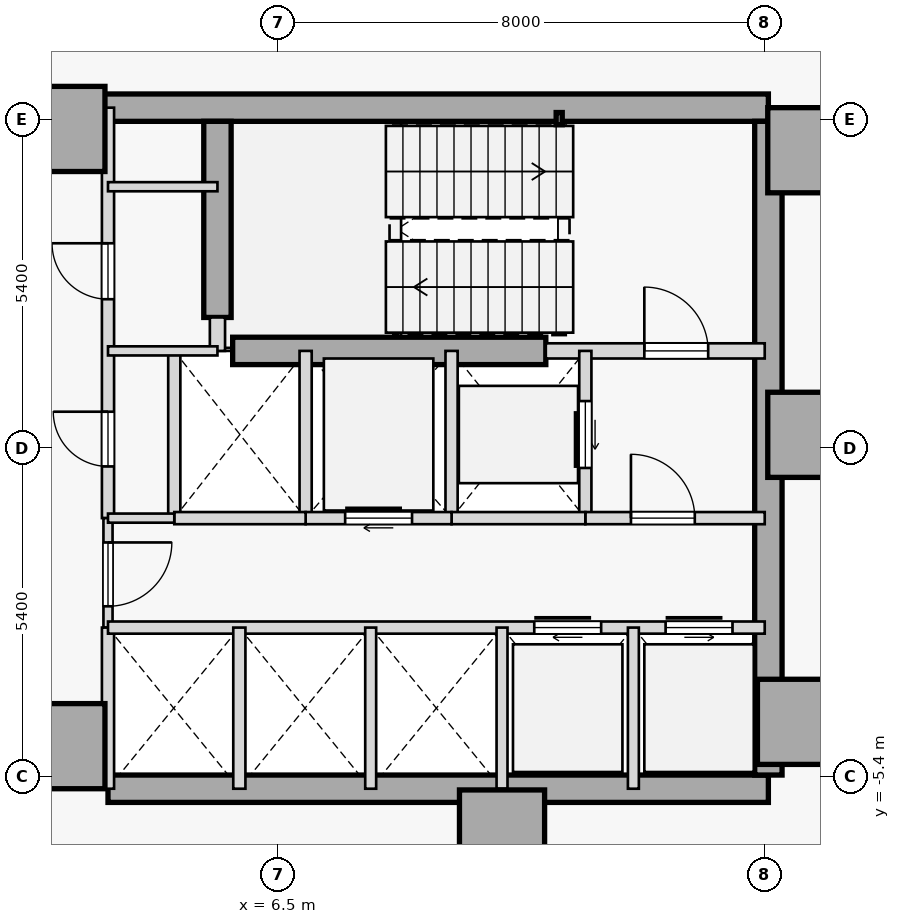
"""IFC4 building model, lengths in metres.
Left out: names, types, materials, properties, quantities, classifications, styles, units other than length and angle.
Written with IfcOpenShell. Run it as: python <this file> out.ifc"""

import sys

from ifc_helpers import new_model, si_unit, direction, frame, frame_2d, origin, origin_2d, place, context, subcontext, project, spatial, rectangle, hollow_rectangle, extrude, element, fill, save


model = new_model("IFC4")
c1 = context("Model", 3, precision=1e-05, world=origin(), true_north=direction((0.0, 1.0)))
c2 = subcontext(c1, "Body", "Model", "MODEL_VIEW")
j1 = project(units=[si_unit("LENGTHUNIT", "METRE"), si_unit("PLANEANGLEUNIT", "RADIAN")], contexts=[c1])
p1 = place(None, origin())
s1 = spatial("IfcSite", under=j1, at=p1, CompositionType="ELEMENT")
p2 = place(p1, origin())
s2 = spatial("IfcBuilding", under=s1, at=p2, CompositionType="ELEMENT")
p3 = place(p2, frame((0.0, 0.0, 67.4)))
s3 = spatial("IfcBuildingStorey", under=s2, at=p3, CompositionType="ELEMENT", Elevation=67.4)
for number, where, z_axis, x_axis in (
    (1, (15.25, 4.9, 0.0), (0.0, 0.0, 1.0), (1.0, 0.0, 0.0)),
    (2, (15.25, 0.22, 0.0), (0.0, 0.0, 1.0), (1.0, 0.0, 0.0)),
    (3, (15.08, -4.5, 0.0), (0.0, 0.0, 1.0), (1.0, 0.0, 0.0)),
    (4, (10.18, -6.32, 0.0), (0.0, 0.0, 1.0), (1.0, 0.0, 0.0)),
    (5, (2.95, -4.9, 0.0), (0.0, 0.0, 1.0), (1.0, 0.0, 0.0)),
    (6, (2.95, 5.25, 0.0), (0.0, 0.0, 1.0), (1.0, 0.0, 0.0)),
):
    element("IfcColumn", number, at=place(p3, frame(where, z_axis=z_axis, x_axis=x_axis)), inside=s3, PredefinedType="COLUMN", context=c2, shape_type="SweptSolid", body=[
        extrude(rectangle(XDim=1.4, YDim=1.4, at=origin_2d()), origin(), (0.0, 0.0, 1.0), 3.8),
    ])
p4 = place(p3, frame((3.15, 5.6, 0.0), z_axis=(0.0, 0.0, 1.0), x_axis=(1.0, 0.0, 0.0)))
e7 = element("IfcWall", 7, at=p4, inside=s3, PredefinedType="SHEAR", context=c2, shape_type="SweptSolid", body=[
    extrude(rectangle(XDim=11.41, YDim=0.45, at=frame_2d((5.705, 0.0))), origin(), (0.0, 0.0, 1.0), 3.575),
])
p5 = place(p3, frame((3.7, -5.6, 0.0), z_axis=(0.0, 0.0, 1.0), x_axis=(1.0, 0.0, 0.0)))
e8 = element("IfcWall", 8, at=p5, inside=s3, PredefinedType="SHEAR", context=c2, shape_type="SweptSolid", body=[
    extrude(rectangle(XDim=10.86, YDim=0.45, at=frame_2d((5.43, 0.0))), origin(), (0.0, 0.0, 1.0), 3.575),
])
p6 = place(p3, frame((14.56, -5.375, 0.0), z_axis=(0.0, 0.0, 1.0), x_axis=(0.0, 1.0, 0.0)))
e9 = element("IfcWall", 9, at=p6, inside=s3, PredefinedType="SHEAR", context=c2, shape_type="SweptSolid", body=[
    extrude(rectangle(XDim=10.75, YDim=0.45, at=frame_2d((5.375, 0.0))), origin(), (0.0, 0.0, 1.0), 3.575),
])
p7 = place(p3, frame((5.5, 2.15, 0.0), z_axis=(0.0, 0.0, 1.0), x_axis=(0.0, 1.0, 0.0)))
e10 = element("IfcWall", 10, at=p7, inside=s3, PredefinedType="SHEAR", context=c2, shape_type="SweptSolid", body=[
    extrude(rectangle(XDim=3.225, YDim=0.45, at=frame_2d((1.613, 0.0))), origin(), (0.0, 0.0, 1.0), 3.575),
])
p8 = place(p3, frame((5.75, 1.6, 0.0), z_axis=(0.0, 0.0, 1.0), x_axis=(1.0, 0.0, 0.0)))
e11 = element("IfcWall", 11, at=p8, inside=s3, PredefinedType="SHEAR", context=c2, shape_type="SweptSolid", body=[
    extrude(rectangle(XDim=5.15, YDim=0.45, at=frame_2d((2.575, 0.0))), origin(), (0.0, 0.0, 1.0), 3.575),
])
p9 = place(p3, frame((11.12, 5.42, 0.0), z_axis=(0.0, 0.0, 1.0), x_axis=(1.0, 0.0, 0.0)))
e12 = element("IfcColumn", 12, at=p9, inside=s3, PredefinedType="COLUMN", context=c2, shape_type="SweptSolid", body=[
    extrude(hollow_rectangle(XDim=0.1, YDim=0.2, WallThickness=0.008, at=origin_2d()), origin(), (0.0, 0.0, 1.0), 3.8),
])
p10 = place(p3, frame((10.9, 1.6, 0.0), z_axis=(0.0, 0.0, 1.0), x_axis=(1.0, 0.0, 0.0)))
e13 = element("IfcWall", 13, at=p10, inside=s3, PredefinedType="STANDARD", context=c2, shape_type="SweptSolid", body=[
    extrude(rectangle(XDim=3.6, YDim=0.25, at=frame_2d((1.8, 0.0))), origin(), (0.0, 0.0, 1.0), 3.575),
])
p11 = place(p10, frame((1.62, 0.0, 0.0)))
e14 = element("IfcOpeningElement", 14, at=p11, cuts=e13, PredefinedType="OPENING", context=c2, shape_type="SweptSolid", body=[
    extrude(rectangle(XDim=1.05, YDim=2.15, at=frame_2d((0.525, 1.075))), frame((0.0, 0.135, 0.0), z_axis=(0.0, -1.0, 0.0), x_axis=(1.0, 0.0, 0.0)), (0.0, 0.0, 1.0), 0.27),
])
p12 = place(p3, frame((5.5, 1.6, 0.0), z_axis=(0.0, 0.0, 1.0), x_axis=(0.0, 1.0, 0.0)))
e15 = element("IfcWall", 15, at=p12, inside=s3, PredefinedType="STANDARD", context=c2, shape_type="SweptSolid", body=[
    extrude(rectangle(XDim=0.55, YDim=0.25, at=frame_2d((0.275, 0.0))), origin(), (0.0, 0.0, 1.0), 3.575),
])
p13 = place(p3, frame((3.7, -1.15, 0.0), z_axis=(0.0, 0.0, 1.0), x_axis=(0.0, 1.0, 0.0)))
e16 = element("IfcWall", 16, at=p13, inside=s3, PredefinedType="STANDARD", context=c2, shape_type="SweptSolid", body=[
    extrude(rectangle(XDim=6.75, YDim=0.2, at=frame_2d((3.375, 0.0))), origin(), (0.0, 0.0, 1.0), 3.575),
])
p14 = place(p13, frame((3.6, 0.0, 0.0)))
e17 = element("IfcOpeningElement", 17, at=p14, cuts=e16, PredefinedType="OPENING", context=c2, shape_type="SweptSolid", body=[
    extrude(rectangle(XDim=0.92, YDim=2.15, at=frame_2d((0.46, 1.075))), frame((0.0, 0.11, 0.0), z_axis=(0.0, -1.0, 0.0), x_axis=(1.0, 0.0, 0.0)), (0.0, 0.0, 1.0), 0.22),
])
p15 = place(p13, frame((0.85, 0.0, 0.0)))
e18 = element("IfcOpeningElement", 18, at=p15, cuts=e16, PredefinedType="OPENING", context=c2, shape_type="SweptSolid", body=[
    extrude(rectangle(XDim=0.9, YDim=2.15, at=frame_2d((0.45, 1.075))), frame((0.0, 0.11, 0.0), z_axis=(0.0, -1.0, 0.0), x_axis=(1.0, 0.0, 0.0)), (0.0, 0.0, 1.0), 0.22),
])
p16 = place(p3, frame((3.7, -2.95, 0.0), z_axis=(0.0, 0.0, 1.0), x_axis=(0.0, 1.0, 0.0)))
e19 = element("IfcWall", 19, at=p16, inside=s3, PredefinedType="PARTITIONING", context=c2, shape_type="SweptSolid", body=[
    extrude(rectangle(XDim=1.8, YDim=0.15, at=frame_2d((0.9, 0.0))), origin(), (0.0, 0.0, 1.0), 3.575),
])
p17 = place(p16, frame((0.35, 0.0, 0.0)))
e20 = element("IfcOpeningElement", 20, at=p17, cuts=e19, PredefinedType="OPENING", context=c2, shape_type="SweptSolid", body=[
    extrude(rectangle(XDim=1.05, YDim=2.18, at=frame_2d((0.525, 1.09))), frame((0.0, 0.085, 0.0), z_axis=(0.0, -1.0, 0.0), x_axis=(1.0, 0.0, 0.0)), (0.0, 0.0, 1.0), 0.17),
])
p18 = place(p3, frame((3.7, -5.6, 0.0), z_axis=(0.0, 0.0, 1.0), x_axis=(0.0, 1.0, 0.0)))
e21 = element("IfcWall", 21, at=p18, inside=s3, PredefinedType="STANDARD", context=c2, shape_type="SweptSolid", body=[
    extrude(rectangle(XDim=2.65, YDim=0.2, at=frame_2d((1.325, 0.0))), origin(), (0.0, 0.0, 1.0), 3.575),
])
p19 = place(p3, frame((11.55, -1.15, 0.0), z_axis=(0.0, 0.0, 1.0), x_axis=(0.0, 1.0, 0.0)))
e22 = element("IfcWall", 22, at=p19, inside=s3, PredefinedType="STANDARD", context=c2, shape_type="SweptSolid", body=[
    extrude(rectangle(XDim=2.75, YDim=0.2, at=frame_2d((1.375, 0.0))), origin(), (0.0, 0.0, 1.0), 3.575),
])
p20 = place(p19, frame((0.825, 0.0, 0.0)))
e23 = element("IfcOpeningElement", 23, at=p20, cuts=e22, PredefinedType="OPENING", context=c2, shape_type="SweptSolid", body=[
    extrude(rectangle(XDim=1.1, YDim=2.15, at=frame_2d((0.55, 1.075))), frame((0.0, 0.11, 0.0), z_axis=(0.0, -1.0, 0.0), x_axis=(1.0, 0.0, 0.0)), (0.0, 0.0, 1.0), 0.22),
])
p21 = place(p3, frame((9.35, -1.15, 0.0), z_axis=(0.0, 0.0, 1.0), x_axis=(0.0, 1.0, 0.0)))
e24 = element("IfcWall", 24, at=p21, inside=s3, PredefinedType="STANDARD", context=c2, shape_type="SweptSolid", body=[
    extrude(rectangle(XDim=2.75, YDim=0.2, at=frame_2d((1.375, 0.0))), origin(), (0.0, 0.0, 1.0), 3.575),
])
p22 = place(p3, frame((11.55, -1.15, 0.0), z_axis=(0.0, 0.0, 1.0), x_axis=(1.0, 0.0, 0.0)))
e25 = element("IfcWall", 25, at=p22, inside=s3, PredefinedType="STANDARD", context=c2, shape_type="SweptSolid", body=[
    extrude(rectangle(XDim=2.95, YDim=0.2, at=frame_2d((1.475, 0.0))), origin(), (0.0, 0.0, 1.0), 3.575),
])
p23 = place(p22, frame((0.75, 0.0, 0.0)))
e26 = element("IfcOpeningElement", 26, at=p23, cuts=e25, PredefinedType="OPENING", context=c2, shape_type="SweptSolid", body=[
    extrude(rectangle(XDim=1.05, YDim=2.18, at=frame_2d((0.525, 1.09))), frame((0.0, 0.11, 0.0), z_axis=(0.0, -1.0, 0.0), x_axis=(1.0, 0.0, 0.0)), (0.0, 0.0, 1.0), 0.22),
])
p24 = place(p3, frame((9.35, -1.15, 0.0), z_axis=(0.0, 0.0, 1.0), x_axis=(1.0, 0.0, 0.0)))
e27 = element("IfcWall", 27, at=p24, inside=s3, PredefinedType="STANDARD", context=c2, shape_type="SweptSolid", body=[
    extrude(rectangle(XDim=2.2, YDim=0.2, at=frame_2d((1.1, 0.0))), origin(), (0.0, 0.0, 1.0), 3.575),
])
p25 = place(p3, frame((6.95, -1.15, 0.0), z_axis=(0.0, 0.0, 1.0), x_axis=(0.0, 1.0, 0.0)))
e28 = element("IfcWall", 28, at=p25, inside=s3, PredefinedType="STANDARD", context=c2, shape_type="SweptSolid", body=[
    extrude(rectangle(XDim=2.75, YDim=0.2, at=frame_2d((1.375, 0.0))), origin(), (0.0, 0.0, 1.0), 3.575),
])
p26 = place(p3, frame((6.95, -1.15, 0.0), z_axis=(0.0, 0.0, 1.0), x_axis=(1.0, 0.0, 0.0)))
e29 = element("IfcWall", 29, at=p26, inside=s3, PredefinedType="STANDARD", context=c2, shape_type="SweptSolid", body=[
    extrude(rectangle(XDim=2.4, YDim=0.2, at=frame_2d((1.2, 0.0))), origin(), (0.0, 0.0, 1.0), 3.575),
])
p27 = place(p26, frame((0.65, 0.0, 0.0)))
e30 = element("IfcOpeningElement", 30, at=p27, cuts=e29, PredefinedType="OPENING", context=c2, shape_type="SweptSolid", body=[
    extrude(rectangle(XDim=1.1, YDim=2.15, at=frame_2d((0.55, 1.075))), frame((0.0, 0.11, 0.0), z_axis=(0.0, -1.0, 0.0), x_axis=(1.0, 0.0, 0.0)), (0.0, 0.0, 1.0), 0.22),
])
p28 = place(p3, frame((4.79, -1.15, 0.0), z_axis=(0.0, 0.0, 1.0), x_axis=(0.0, 1.0, 0.0)))
e31 = element("IfcWall", 31, at=p28, inside=s3, PredefinedType="STANDARD", context=c2, shape_type="SweptSolid", body=[
    extrude(rectangle(XDim=2.75, YDim=0.2, at=frame_2d((1.375, 0.0))), origin(), (0.0, 0.0, 1.0), 3.575),
])
p29 = place(p3, frame((4.79, -1.15, 0.0), z_axis=(0.0, 0.0, 1.0), x_axis=(1.0, 0.0, 0.0)))
e32 = element("IfcWall", 32, at=p29, inside=s3, PredefinedType="STANDARD", context=c2, shape_type="SweptSolid", body=[
    extrude(rectangle(XDim=2.16, YDim=0.2, at=frame_2d((1.08, 0.0))), origin(), (0.0, 0.0, 1.0), 3.575),
])
p30 = place(p3, frame((3.7, -1.15, 0.0), z_axis=(0.0, 0.0, 1.0), x_axis=(1.0, 0.0, 0.0)))
e33 = element("IfcWall", 33, at=p30, inside=s3, PredefinedType="PARTITIONING", context=c2, shape_type="SweptSolid", body=[
    extrude(rectangle(XDim=1.09, YDim=0.15, at=frame_2d((0.545, 0.0))), origin(), (0.0, 0.0, 1.0), 3.575),
])
p31 = place(p3, frame((3.7, -2.95, 0.0), z_axis=(0.0, 0.0, 1.0), x_axis=(1.0, 0.0, 0.0)))
e34 = element("IfcWall", 34, at=p31, inside=s3, PredefinedType="STANDARD", context=c2, shape_type="SweptSolid", body=[
    extrude(rectangle(XDim=10.8, YDim=0.2, at=frame_2d((5.4, 0.0))), origin(), (0.0, 0.0, 1.0), 3.575),
])
p32 = place(p31, frame((7.01, 0.0, 0.0)))
e35 = element("IfcOpeningElement", 35, at=p32, cuts=e34, PredefinedType="OPENING", context=c2, shape_type="SweptSolid", body=[
    extrude(rectangle(XDim=1.1, YDim=2.15, at=frame_2d((0.55, 1.075))), frame((0.0, 0.11, 0.0), z_axis=(0.0, -1.0, 0.0), x_axis=(1.0, 0.0, 0.0)), (0.0, 0.0, 1.0), 0.22),
])
p33 = place(p31, frame((9.17, 0.0, 0.0)))
e36 = element("IfcOpeningElement", 36, at=p33, cuts=e34, PredefinedType="OPENING", context=c2, shape_type="SweptSolid", body=[
    extrude(rectangle(XDim=1.1, YDim=2.15, at=frame_2d((0.55, 1.075))), frame((0.0, 0.11, 0.0), z_axis=(0.0, -1.0, 0.0), x_axis=(1.0, 0.0, 0.0)), (0.0, 0.0, 1.0), 0.22),
])
p34 = place(p3, frame((5.86, -5.6, 0.0), z_axis=(0.0, 0.0, 1.0), x_axis=(0.0, 1.0, 0.0)))
e37 = element("IfcWall", 37, at=p34, inside=s3, PredefinedType="STANDARD", context=c2, shape_type="SweptSolid", body=[
    extrude(rectangle(XDim=2.65, YDim=0.2, at=frame_2d((1.325, 0.0))), origin(), (0.0, 0.0, 1.0), 3.575),
])
for number, where, z_axis, x_axis in (
    (38, (12.34, -5.6, 0.0), (0.0, 0.0, 1.0), (0.0, 1.0, 0.0)),
    (39, (10.18, -5.6, 0.0), (0.0, 0.0, 1.0), (0.0, 1.0, 0.0)),
    (40, (8.02, -5.6, 0.0), (0.0, 0.0, 1.0), (0.0, 1.0, 0.0)),
):
    element("IfcWall", number, at=place(p3, frame(where, z_axis=z_axis, x_axis=x_axis)), inside=s3, PredefinedType="STANDARD", context=c2, shape_type="SweptSolid", body=[
        extrude(rectangle(XDim=2.65, YDim=0.18, at=frame_2d((1.325, 0.0))), origin(), (0.0, 0.0, 1.0), 3.575),
    ])
for number, where, z_axis, x_axis in (
    (41, (3.7, 4.3, 0.0), (0.0, 0.0, 1.0), (1.0, 0.0, 0.0)),
    (42, (3.7, 1.6, 0.0), (0.0, 0.0, 1.0), (1.0, 0.0, 0.0)),
):
    element("IfcWall", number, at=place(p3, frame(where, z_axis=z_axis, x_axis=x_axis)), inside=s3, PredefinedType="PARTITIONING", context=c2, shape_type="SweptSolid", body=[
        extrude(rectangle(XDim=1.8, YDim=0.15, at=frame_2d((0.9, 0.0))), origin(), (0.0, 0.0, 1.0), 3.575),
    ])
p35 = place(p11, origin())
e43 = element("IfcDoor", 43, at=p35, inside=s3, OperationType="SINGLE_SWING_LEFT", PredefinedType="DOOR", context=c2, shape_type="SweptSolid", body=[
    extrude(rectangle(XDim=1.05, YDim=2.15, at=frame_2d((0.525, 1.075))), frame((0.0, 0.025, 0.0), z_axis=(0.0, -1.0, 0.0), x_axis=(1.0, 0.0, 0.0)), (0.0, 0.0, 1.0), 0.05),
])
fill(e14, e43)
p36 = place(p23, origin())
e44 = element("IfcDoor", 44, at=p36, inside=s3, OperationType="SINGLE_SWING_LEFT", PredefinedType="DOOR", context=c2, shape_type="SweptSolid", body=[
    extrude(rectangle(XDim=1.05, YDim=2.18, at=frame_2d((0.525, 1.09))), frame((0.0, 0.025, 0.0), z_axis=(0.0, -1.0, 0.0), x_axis=(1.0, 0.0, 0.0)), (0.0, 0.0, 1.0), 0.05),
])
fill(e26, e44)
p37 = place(p17, frame((1.05, 0.0, 0.0), z_axis=(0.0, 0.0, 1.0), x_axis=(-1.0, 0.0, 0.0)))
e45 = element("IfcDoor", 45, at=p37, inside=s3, OperationType="SINGLE_SWING_RIGHT", PredefinedType="DOOR", context=c2, shape_type="SweptSolid", body=[
    extrude(rectangle(XDim=1.05, YDim=2.18, at=frame_2d((0.525, 1.09))), frame((0.0, 0.025, 0.0), z_axis=(0.0, -1.0, 0.0), x_axis=(1.0, 0.0, 0.0)), (0.0, 0.0, 1.0), 0.05),
])
fill(e20, e45)
p38 = place(p20, origin())
e46 = element("IfcDoor", 46, at=p38, inside=s3, OperationType="SLIDING_TO_RIGHT", PredefinedType="DOOR", context=c2, shape_type="SweptSolid", body=[
    extrude(rectangle(XDim=1.1, YDim=2.15, at=frame_2d((0.55, 1.075))), frame((0.0, 0.025, 0.0), z_axis=(0.0, -1.0, 0.0), x_axis=(1.0, 0.0, 0.0)), (0.0, 0.0, 1.0), 0.05),
])
fill(e23, e46)
p39 = place(p27, origin())
e47 = element("IfcDoor", 47, at=p39, inside=s3, OperationType="SLIDING_TO_RIGHT", PredefinedType="DOOR", context=c2, shape_type="SweptSolid", body=[
    extrude(rectangle(XDim=1.1, YDim=2.15, at=frame_2d((0.55, 1.075))), frame((0.0, 0.025, 0.0), z_axis=(0.0, -1.0, 0.0), x_axis=(1.0, 0.0, 0.0)), (0.0, 0.0, 1.0), 0.05),
])
fill(e30, e47)
p40 = place(p32, origin())
e48 = element("IfcDoor", 48, at=p40, inside=s3, OperationType="SLIDING_TO_RIGHT", PredefinedType="DOOR", context=c2, shape_type="SweptSolid", body=[
    extrude(rectangle(XDim=1.1, YDim=2.15, at=frame_2d((0.55, 1.075))), frame((0.0, 0.025, 0.0), z_axis=(0.0, -1.0, 0.0), x_axis=(1.0, 0.0, 0.0)), (0.0, 0.0, 1.0), 0.05),
])
fill(e35, e48)
p41 = place(p33, origin())
e49 = element("IfcDoor", 49, at=p41, inside=s3, OperationType="SLIDING_TO_LEFT", PredefinedType="DOOR", context=c2, shape_type="SweptSolid", body=[
    extrude(rectangle(XDim=1.1, YDim=2.15, at=frame_2d((0.55, 1.075))), frame((0.0, 0.025, 0.0), z_axis=(0.0, -1.0, 0.0), x_axis=(1.0, 0.0, 0.0)), (0.0, 0.0, 1.0), 0.05),
])
fill(e36, e49)
p42 = place(p14, origin())
e50 = element("IfcDoor", 50, at=p42, inside=s3, OperationType="SINGLE_SWING_RIGHT", PredefinedType="DOOR", context=c2, shape_type="SweptSolid", body=[
    extrude(rectangle(XDim=0.92, YDim=2.15, at=frame_2d((0.46, 1.075))), frame((0.0, 0.025, 0.0), z_axis=(0.0, -1.0, 0.0), x_axis=(1.0, 0.0, 0.0)), (0.0, 0.0, 1.0), 0.05),
])
fill(e17, e50)
p43 = place(p15, origin())
e51 = element("IfcDoor", 51, at=p43, inside=s3, OperationType="SINGLE_SWING_RIGHT", PredefinedType="DOOR", context=c2, shape_type="SweptSolid", body=[
    extrude(rectangle(XDim=0.9, YDim=2.15, at=frame_2d((0.45, 1.075))), frame((0.0, 0.025, 0.0), z_axis=(0.0, -1.0, 0.0), x_axis=(1.0, 0.0, 0.0)), (0.0, 0.0, 1.0), 0.05),
])
fill(e18, e51)
save(model, sys.argv[1])
